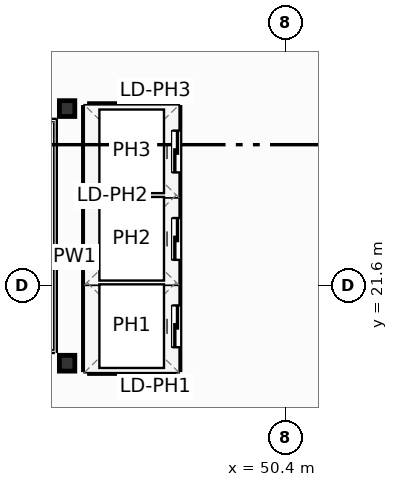
"""IFC4 building model, lengths in metres.
Left out: names, types, materials, properties, quantities, classifications, styles, units other than length and angle.
Written with IfcOpenShell. Run it as: python <this file> out.ifc"""

import sys

from ifc_helpers import new_model, si_unit, direction, frame, frame_2d, origin, origin_2d, place, context, subcontext, project, spatial, rectangle, i_section, extrude, element, fill, save


model = new_model("IFC4")
c1 = context("Model", 3, precision=1e-05, world=origin(), true_north=direction((0.0, 1.0)))
c2 = subcontext(c1, "Body", "Model", "MODEL_VIEW")
j1 = project(units=[si_unit("LENGTHUNIT", "METRE"), si_unit("PLANEANGLEUNIT", "RADIAN")], contexts=[c1])
p1 = place(None, origin())
s1 = spatial("IfcSite", under=j1, at=p1, CompositionType="ELEMENT")
p2 = place(p1, origin())
s2 = spatial("IfcBuilding", under=s1, at=p2, CompositionType="ELEMENT")
p3 = place(p2, frame((0.0, 0.0, 258.2)))
s3 = spatial("IfcBuildingStorey", under=s2, at=p3, CompositionType="ELEMENT", Elevation=258.2)
for number, where, z_axis, x_axis in (
    (1, (44.65, 19.55, 0.0), (0.0, 0.0, 1.0), (1.0, 0.0, 0.0)),
    (2, (44.65, 26.25, 0.0), (0.0, 0.0, 1.0), (1.0, 0.0, 0.0)),
):
    element("IfcColumn", number, at=place(p3, frame(where, z_axis=z_axis, x_axis=x_axis)), inside=s3, PredefinedType="COLUMN", context=c2, shape_type="SweptSolid", body=[
        extrude(i_section(OverallWidth=0.406, OverallDepth=0.416, WebThickness=0.03, FlangeThickness=0.048, FilletRadius=0.025, at=origin_2d()), origin(), (0.0, 0.0, 1.0), 3.7),
    ])
for number, where, z_axis, x_axis in (
    (3, (45.24, 21.675, 0.0), (0.0, 0.0, 1.0), (1.0, 0.0, 0.0)),
    (4, (45.24, 23.975, 0.0), (0.0, 0.0, 1.0), (1.0, 0.0, 0.0)),
):
    element("IfcWall", number, at=place(p3, frame(where, z_axis=z_axis, x_axis=x_axis)), inside=s3, PredefinedType="PARTITIONING", context=c2, shape_type="SweptSolid", body=[
        extrude(rectangle(XDim=2.22, YDim=0.2, at=frame_2d((1.11, 0.0))), origin(), (0.0, 0.0, 1.0), 3.45),
    ])
p4 = place(p3, frame((45.24, 19.38, 0.0), z_axis=(0.0, 0.0, 1.0), x_axis=(1.0, 0.0, 0.0)))
e5 = element("IfcWall", 5, at=p4, inside=s3, PredefinedType="PARTITIONING", context=c2, shape_type="SweptSolid", body=[
    extrude(rectangle(XDim=2.22, YDim=0.2, at=frame_2d((1.11, 0.0))), origin(), (0.0, 0.0, 1.0), 2.662),
])
p5 = place(p3, frame((45.24, 26.28, 0.0), z_axis=(0.0, 0.0, 1.0), x_axis=(1.0, 0.0, 0.0)))
e6 = element("IfcWall", 6, at=p5, inside=s3, PredefinedType="PARTITIONING", context=c2, shape_type="SweptSolid", body=[
    extrude(rectangle(XDim=2.22, YDim=0.2, at=frame_2d((1.11, 0.0))), origin(), (0.0, 0.0, 1.0), 3.45),
])
p6 = place(p3, frame((45.18, 19.38, 0.0), z_axis=(0.0, 0.0, 1.0), x_axis=(0.0, 1.0, 0.0)))
e7 = element("IfcWall", 7, at=p6, inside=s3, PredefinedType="PARTITIONING", context=c2, shape_type="SweptSolid", body=[
    extrude(rectangle(XDim=6.9, YDim=0.2, at=frame_2d((3.45, 0.0))), origin(), (0.0, 0.0, 1.0), 3.45),
])
p7 = place(p3, frame((47.52, 19.38, 0.0), z_axis=(0.0, 0.0, 1.0), x_axis=(0.0, 1.0, 0.0)))
e8 = element("IfcWall", 8, at=p7, inside=s3, PredefinedType="PARTITIONING", context=c2, shape_type="SweptSolid", body=[
    extrude(rectangle(XDim=6.9, YDim=0.2, at=frame_2d((3.45, 0.0))), origin(), (0.0, 0.0, 1.0), 3.45),
])
p8 = place(p7, frame((0.59, 0.0, 0.0)))
e9 = element("IfcOpeningElement", 9, at=p8, cuts=e8, PredefinedType="OPENING", context=c2, shape_type="SweptSolid", body=[
    extrude(rectangle(XDim=1.1, YDim=2.15, at=frame_2d((0.55, 1.075))), frame((0.0, 0.11, 0.0), z_axis=(0.0, -1.0, 0.0), x_axis=(1.0, 0.0, 0.0)), (0.0, 0.0, 1.0), 0.22),
])
p9 = place(p7, frame((2.89, 0.0, 0.0)))
e10 = element("IfcOpeningElement", 10, at=p9, cuts=e8, PredefinedType="OPENING", context=c2, shape_type="SweptSolid", body=[
    extrude(rectangle(XDim=1.1, YDim=2.15, at=frame_2d((0.55, 1.075))), frame((0.0, 0.11, 0.0), z_axis=(0.0, -1.0, 0.0), x_axis=(1.0, 0.0, 0.0)), (0.0, 0.0, 1.0), 0.22),
])
p10 = place(p7, frame((5.19, 0.0, 0.0)))
e11 = element("IfcOpeningElement", 11, at=p10, cuts=e8, PredefinedType="OPENING", context=c2, shape_type="SweptSolid", body=[
    extrude(rectangle(XDim=1.1, YDim=2.15, at=frame_2d((0.55, 1.075))), frame((0.0, 0.11, 0.0), z_axis=(0.0, -1.0, 0.0), x_axis=(1.0, 0.0, 0.0)), (0.0, 0.0, 1.0), 0.22),
])
p11 = place(p8, origin())
e12 = element("IfcDoor", 12, at=p11, inside=s3, OperationType="SLIDING_TO_LEFT", PredefinedType="DOOR", context=c2, shape_type="SweptSolid", body=[
    extrude(rectangle(XDim=1.1, YDim=2.15, at=frame_2d((0.55, 1.075))), frame((0.0, 0.025, 0.0), z_axis=(0.0, -1.0, 0.0), x_axis=(1.0, 0.0, 0.0)), (0.0, 0.0, 1.0), 0.05),
])
fill(e9, e12)
p12 = place(p9, origin())
e13 = element("IfcDoor", 13, at=p12, inside=s3, OperationType="SLIDING_TO_LEFT", PredefinedType="DOOR", context=c2, shape_type="SweptSolid", body=[
    extrude(rectangle(XDim=1.1, YDim=2.15, at=frame_2d((0.55, 1.075))), frame((0.0, 0.025, 0.0), z_axis=(0.0, -1.0, 0.0), x_axis=(1.0, 0.0, 0.0)), (0.0, 0.0, 1.0), 0.05),
])
fill(e10, e13)
p13 = place(p10, origin())
e14 = element("IfcDoor", 14, at=p13, inside=s3, OperationType="SLIDING_TO_LEFT", PredefinedType="DOOR", context=c2, shape_type="SweptSolid", body=[
    extrude(rectangle(XDim=1.1, YDim=2.15, at=frame_2d((0.55, 1.075))), frame((0.0, 0.025, 0.0), z_axis=(0.0, -1.0, 0.0), x_axis=(1.0, 0.0, 0.0)), (0.0, 0.0, 1.0), 0.05),
])
fill(e11, e14)
save(model, sys.argv[1])
